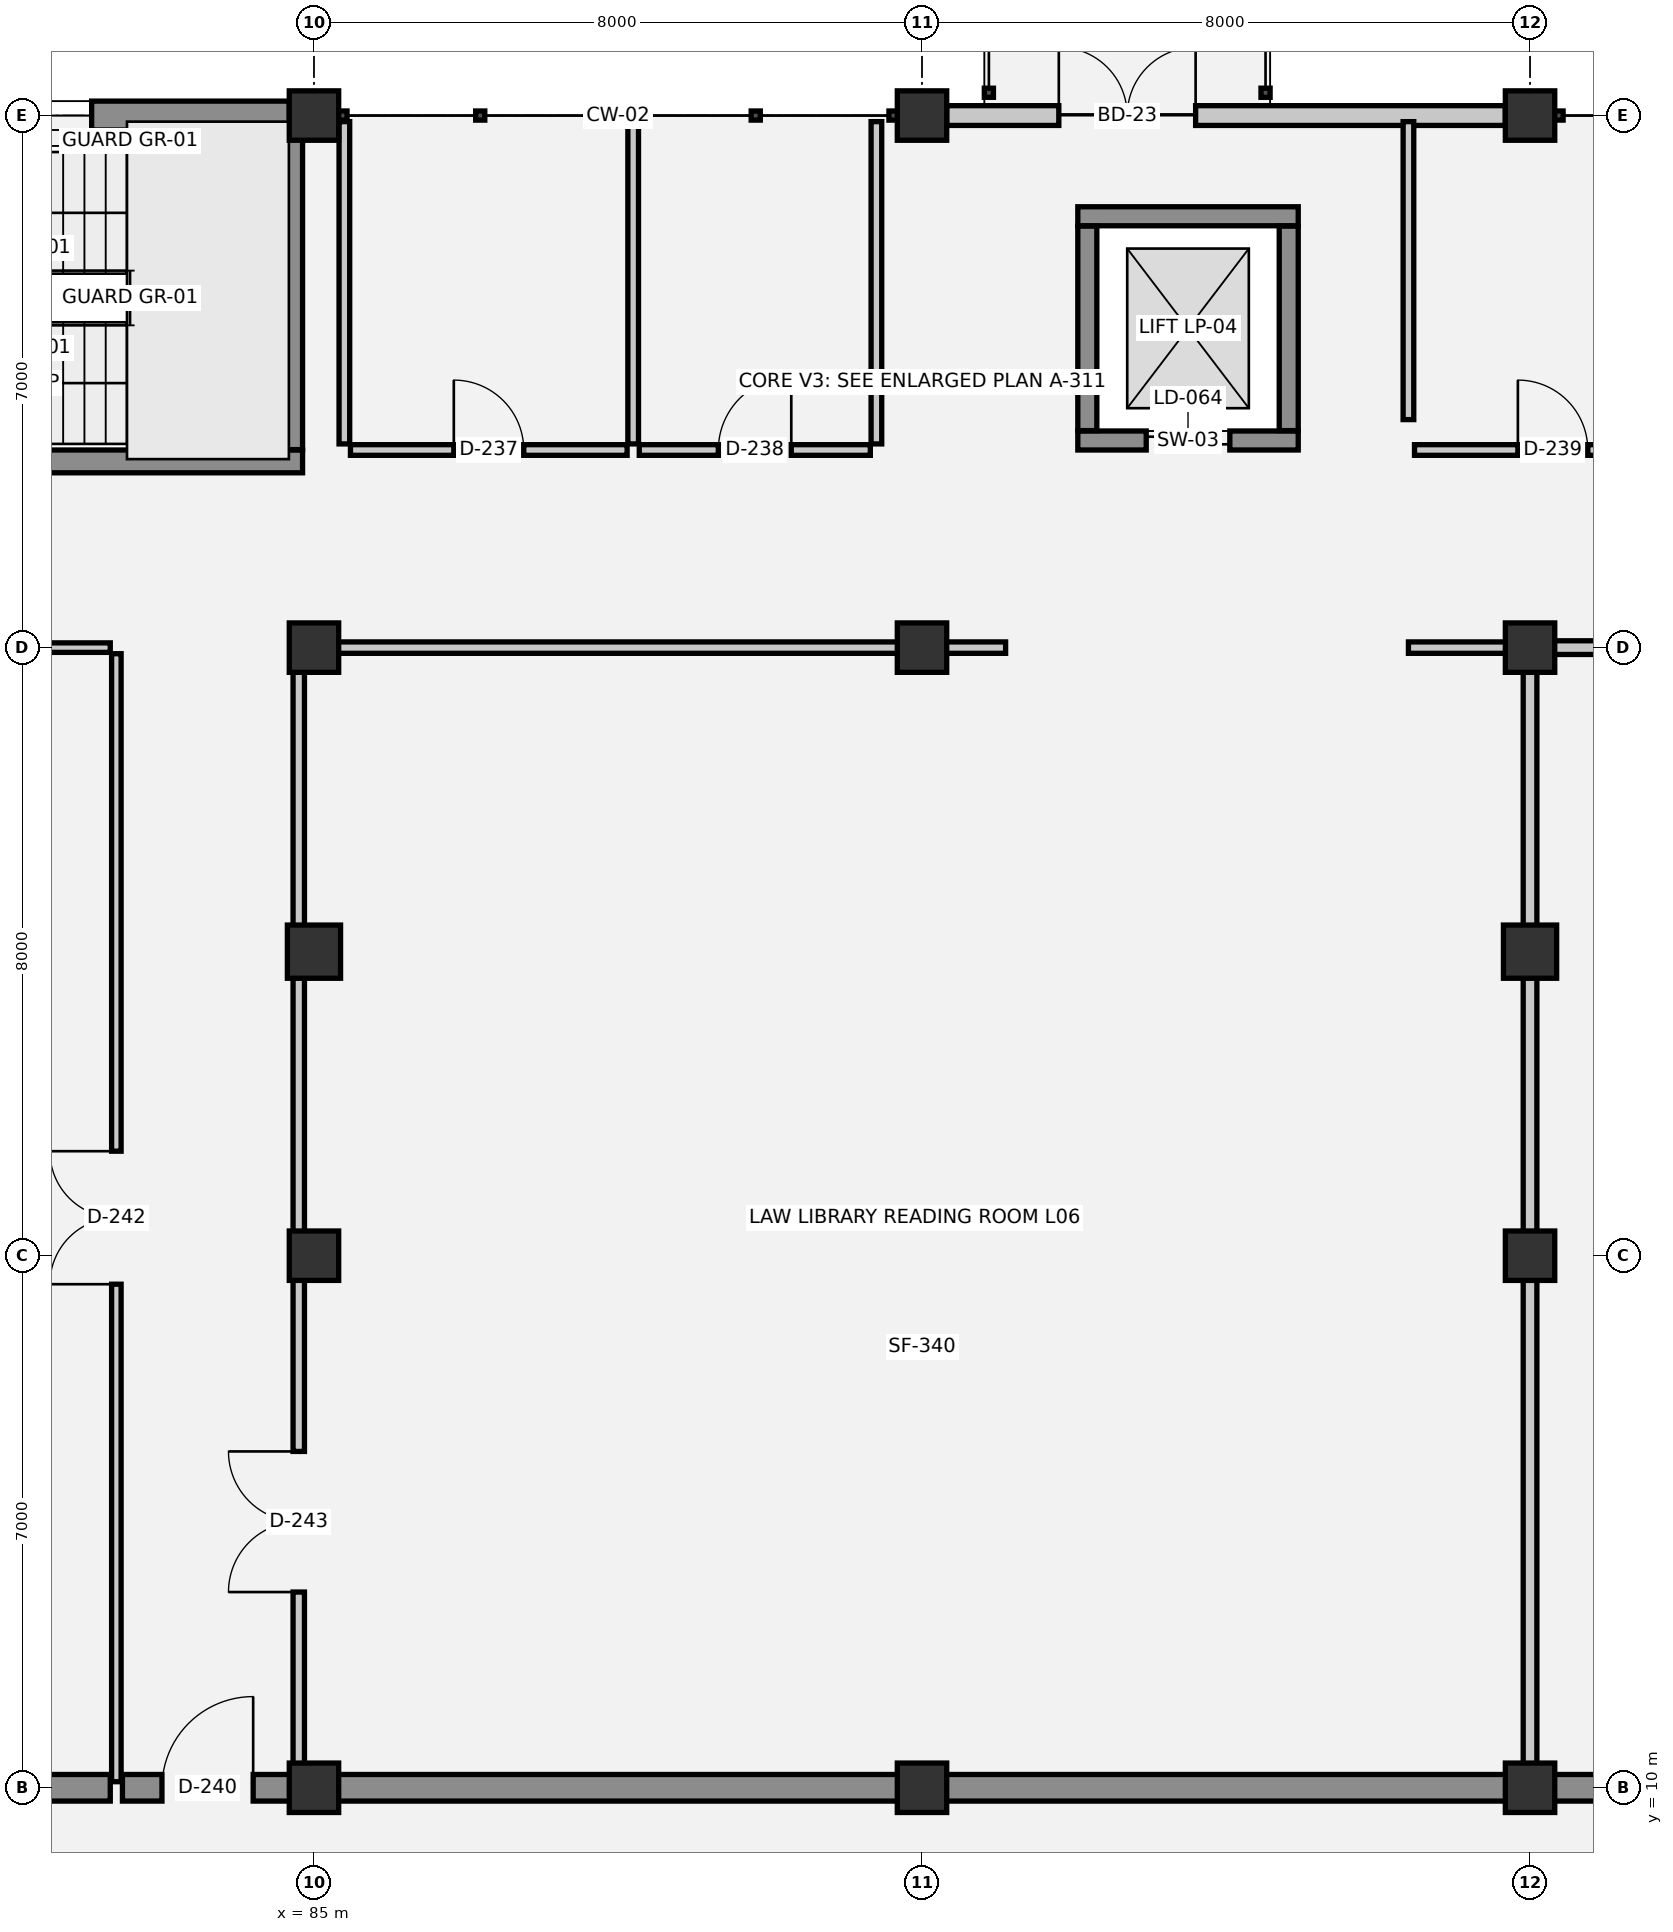
"""IFC4 building model, lengths in metres.
Left out: names, types, materials, properties, quantities, classifications, styles, units other than length and angle.
Written with IfcOpenShell. Run it as: python <this file> out.ifc"""

import sys

from ifc_helpers import new_model, si_unit, direction, frame, frame_2d, origin, origin_2d, place, context, subcontext, project, spatial, rectangle, circle, extrude, element, fill, save


model = new_model("IFC4")
c1 = context("Model", 3, precision=1e-05, world=origin(), true_north=direction((0.0, 1.0)))
c2 = subcontext(c1, "Body", "Model", "MODEL_VIEW")
j1 = project(units=[si_unit("LENGTHUNIT", "METRE"), si_unit("PLANEANGLEUNIT", "RADIAN")], contexts=[c1])
p1 = place(None, origin())
s1 = spatial("IfcSite", under=j1, at=p1, CompositionType="ELEMENT")
p2 = place(p1, origin())
s2 = spatial("IfcBuilding", under=s1, at=p2, CompositionType="ELEMENT")
p3 = place(p2, frame((0.0, 0.0, 9.9)))
s3 = spatial("IfcBuildingStorey", under=s2, at=p3, CompositionType="ELEMENT", Elevation=9.9)
for number, where, z_axis, x_axis in (
    (1, (85.0, 10.0, 0.0), (0.0, 0.0, 1.0), (1.0, 0.0, 0.0)),
    (2, (85.0, 17.0, 0.0), (0.0, 0.0, 1.0), (1.0, 0.0, 0.0)),
    (3, (85.0, 25.0, 0.0), (0.0, 0.0, 1.0), (1.0, 0.0, 0.0)),
    (4, (85.0, 32.0, 0.0), (0.0, 0.0, 1.0), (1.0, 0.0, 0.0)),
    (5, (93.0, 10.0, 0.0), (0.0, 0.0, 1.0), (1.0, 0.0, 0.0)),
    (6, (93.0, 25.0, 0.0), (0.0, 0.0, 1.0), (1.0, 0.0, 0.0)),
    (7, (93.0, 32.0, 0.0), (0.0, 0.0, 1.0), (1.0, 0.0, 0.0)),
    (8, (101.0, 10.0, 0.0), (0.0, 0.0, 1.0), (1.0, 0.0, 0.0)),
    (9, (101.0, 17.0, 0.0), (0.0, 0.0, 1.0), (1.0, 0.0, 0.0)),
    (10, (101.0, 25.0, 0.0), (0.0, 0.0, 1.0), (1.0, 0.0, 0.0)),
    (11, (101.0, 32.0, 0.0), (0.0, 0.0, 1.0), (1.0, 0.0, 0.0)),
):
    element("IfcColumn", number, at=place(p3, frame(where, z_axis=z_axis, x_axis=x_axis)), inside=s3, PredefinedType="COLUMN", context=c2, shape_type="SweptSolid", body=[
        extrude(rectangle(XDim=0.65, YDim=0.65, at=origin_2d()), origin(), (0.0, 0.0, 1.0), 4.5),
    ])
for number, where, z_axis, x_axis in (
    (12, (85.0, 21.0, 0.0), (0.0, 0.0, 1.0), (1.0, 0.0, 0.0)),
    (13, (101.0, 21.0, 0.0), (0.0, 0.0, 1.0), (1.0, 0.0, 0.0)),
):
    element("IfcColumn", number, at=place(p3, frame(where, z_axis=z_axis, x_axis=x_axis)), inside=s3, PredefinedType="COLUMN", context=c2, shape_type="SweptSolid", body=[
        extrude(circle(Radius=0.35, at=origin_2d()), origin(), (0.0, 0.0, 1.0), 4.5),
    ])
p4 = place(p3, frame((77.325, 32.0, 0.0), z_axis=(0.0, 0.0, 1.0), x_axis=(1.0, 0.0, 0.0)))
e14 = element("IfcWall", 14, at=p4, inside=s3, PredefinedType="STANDARD", context=c2, shape_type="SweptSolid", body=[
    extrude(rectangle(XDim=7.35, YDim=0.38, at=frame_2d((3.675, 0.0))), origin(), (0.0, 0.0, 1.0), 3.44),
])
p5 = place(p4, frame((2.6, 0.0, 0.95)))
e15 = element("IfcOpeningElement", 15, at=p5, cuts=e14, PredefinedType="OPENING", context=c2, shape_type="SweptSolid", body=[
    extrude(rectangle(XDim=2.15, YDim=1.9, at=frame_2d((1.075, 0.95))), frame((0.0, 0.2, 0.0), z_axis=(0.0, -1.0, 0.0), x_axis=(1.0, 0.0, 0.0)), (0.0, 0.0, 1.0), 0.4),
])
p6 = place(p3, frame((93.325, 32.0, 0.0), z_axis=(0.0, 0.0, 1.0), x_axis=(1.0, 0.0, 0.0)))
e16 = element("IfcWall", 16, at=p6, inside=s3, PredefinedType="SOLIDWALL", context=c2, shape_type="SweptSolid", body=[
    extrude(rectangle(XDim=7.35, YDim=0.26, at=frame_2d((3.675, 0.0))), origin(), (0.0, 0.0, 1.0), 3.44),
])
p7 = place(p6, frame((1.475, 0.0, 0.0)))
e17 = element("IfcOpeningElement", 17, at=p7, cuts=e16, PredefinedType="OPENING", context=c2, shape_type="SweptSolid", body=[
    extrude(rectangle(XDim=1.8, YDim=2.25, at=frame_2d((0.9, 1.125))), frame((0.0, 0.14, 0.0), z_axis=(0.0, -1.0, 0.0), x_axis=(1.0, 0.0, 0.0)), (0.0, 0.0, 1.0), 0.28),
])
p8 = place(p3, frame((95.05, 27.725, 0.0), z_axis=(0.0, 0.0, 1.0), x_axis=(1.0, 0.0, 0.0)))
e18 = element("IfcWall", 18, at=p8, inside=s3, PredefinedType="SHEAR", context=c2, shape_type="SweptSolid", body=[
    extrude(rectangle(XDim=2.9, YDim=0.25, at=frame_2d((1.45, 0.0))), origin(), (0.0, 0.0, 1.0), 4.5),
])
p9 = place(p8, frame((0.9, 0.0, 0.0)))
e19 = element("IfcOpeningElement", 19, at=p9, cuts=e18, PredefinedType="OPENING", context=c2, shape_type="SweptSolid", body=[
    extrude(rectangle(XDim=1.1, YDim=2.15, at=frame_2d((0.55, 1.075))), frame((0.0, 0.135, 0.0), z_axis=(0.0, -1.0, 0.0), x_axis=(1.0, 0.0, 0.0)), (0.0, 0.0, 1.0), 0.27),
])
p10 = place(p3, frame((97.95, 30.675, 0.0), z_axis=(0.0, 0.0, 1.0), x_axis=(-1.0, 0.0, 0.0)))
e20 = element("IfcWall", 20, at=p10, inside=s3, PredefinedType="SHEAR", context=c2, shape_type="SweptSolid", body=[
    extrude(rectangle(XDim=2.9, YDim=0.25, at=frame_2d((1.45, 0.0))), origin(), (0.0, 0.0, 1.0), 4.5),
])
for number, where, z_axis, x_axis in (
    (21, (95.175, 30.545, 0.0), (0.0, 0.0, 1.0), (0.0, -1.0, 0.0)),
    (22, (97.825, 27.855, 0.0), (0.0, 0.0, 1.0), (0.0, 1.0, 0.0)),
):
    element("IfcWall", number, at=place(p3, frame(where, z_axis=z_axis, x_axis=x_axis)), inside=s3, PredefinedType="SHEAR", context=c2, shape_type="SweptSolid", body=[
        extrude(rectangle(XDim=2.69, YDim=0.25, at=frame_2d((1.345, 0.0))), origin(), (0.0, 0.0, 1.0), 4.5),
    ])
p11 = place(p3, frame((77.15, 27.45, 0.0), z_axis=(0.0, 0.0, 1.0), x_axis=(1.0, 0.0, 0.0)))
e23 = element("IfcWall", 23, at=p11, inside=s3, PredefinedType="SHEAR", context=c2, shape_type="SweptSolid", body=[
    extrude(rectangle(XDim=7.7, YDim=0.3, at=frame_2d((3.85, 0.0))), origin(), (0.0, 0.0, 1.0), 4.16),
])
p12 = place(p11, frame((0.425, 0.0, 0.0)))
e24 = element("IfcOpeningElement", 24, at=p12, cuts=e23, PredefinedType="OPENING", context=c2, shape_type="SweptSolid", body=[
    extrude(rectangle(XDim=1.25, YDim=2.15, at=frame_2d((0.625, 1.075))), frame((0.0, 0.16, 0.0), z_axis=(0.0, -1.0, 0.0), x_axis=(1.0, 0.0, 0.0)), (0.0, 0.0, 1.0), 0.32),
])
p13 = place(p3, frame((84.7, 27.605, 0.0), z_axis=(0.0, 0.0, 1.0), x_axis=(0.0, 1.0, 0.0)))
e25 = element("IfcWall", 25, at=p13, inside=s3, PredefinedType="SHEAR", context=c2, shape_type="SweptSolid", body=[
    extrude(rectangle(XDim=4.2, YDim=0.3, at=frame_2d((2.1, 0.0))), origin(), (0.0, 0.0, 1.0), 4.16),
])
p14 = place(p3, frame((69.08, 10.0, 0.0), z_axis=(0.0, 0.0, 1.0), x_axis=(1.0, 0.0, 0.0)))
e26 = element("IfcWall", 26, at=p14, inside=s3, PredefinedType="SHEAR", context=c2, shape_type="SweptSolid", body=[
    extrude(rectangle(XDim=13.24, YDim=0.35, at=frame_2d((6.62, 0.0))), origin(), (0.0, 0.0, 1.0), 4.14),
])
p15 = place(p3, frame((82.48, 10.0, 0.0), z_axis=(0.0, 0.0, 1.0), x_axis=(1.0, 0.0, 0.0)))
e27 = element("IfcWall", 27, at=p15, inside=s3, PredefinedType="SHEAR", context=c2, shape_type="SweptSolid", body=[
    extrude(rectangle(XDim=2.24, YDim=0.35, at=frame_2d((1.12, 0.0))), origin(), (0.0, 0.0, 1.0), 4.14),
])
p16 = place(p15, frame((0.52, 0.0, 0.0)))
e28 = element("IfcOpeningElement", 28, at=p16, cuts=e27, PredefinedType="OPENING", context=c2, shape_type="SweptSolid", body=[
    extrude(rectangle(XDim=1.2, YDim=2.15, at=frame_2d((0.6, 1.075))), frame((0.0, 0.185, 0.0), z_axis=(0.0, -1.0, 0.0), x_axis=(1.0, 0.0, 0.0)), (0.0, 0.0, 1.0), 0.37),
])
p17 = place(p3, frame((84.88, 10.0, 0.0), z_axis=(0.0, 0.0, 1.0), x_axis=(1.0, 0.0, 0.0)))
e29 = element("IfcWall", 29, at=p17, inside=s3, PredefinedType="SHEAR", context=c2, shape_type="SweptSolid", body=[
    extrude(rectangle(XDim=16.04, YDim=0.35, at=frame_2d((8.02, 0.0))), origin(), (0.0, 0.0, 1.0), 4.14),
])
p18 = place(p3, frame((101.08, 10.0, 0.0), z_axis=(0.0, 0.0, 1.0), x_axis=(1.0, 0.0, 0.0)))
e30 = element("IfcWall", 30, at=p18, inside=s3, PredefinedType="SHEAR", context=c2, shape_type="SweptSolid", body=[
    extrude(rectangle(XDim=15.84, YDim=0.35, at=frame_2d((7.92, 0.0))), origin(), (0.0, 0.0, 1.0), 4.14),
])
p19 = place(p3, frame((69.08, 25.0, 0.0), z_axis=(0.0, 0.0, 1.0), x_axis=(1.0, 0.0, 0.0)))
e31 = element("IfcWall", 31, at=p19, inside=s3, PredefinedType="PARTITIONING", context=c2, shape_type="SweptSolid", body=[
    extrude(rectangle(XDim=13.24, YDim=0.125, at=frame_2d((6.62, 0.0))), origin(), (0.0, 0.0, 1.0), 3.56),
])
p20 = place(p3, frame((84.88, 25.0, 0.0), z_axis=(0.0, 0.0, 1.0), x_axis=(1.0, 0.0, 0.0)))
e32 = element("IfcWall", 32, at=p20, inside=s3, PredefinedType="PARTITIONING", context=c2, shape_type="SweptSolid", body=[
    extrude(rectangle(XDim=9.22, YDim=0.15, at=frame_2d((4.61, 0.0))), origin(), (0.0, 0.0, 1.0), 3.56),
])
p21 = place(p3, frame((99.4, 25.0, 0.0), z_axis=(0.0, 0.0, 1.0), x_axis=(1.0, 0.0, 0.0)))
e33 = element("IfcWall", 33, at=p21, inside=s3, PredefinedType="PARTITIONING", context=c2, shape_type="SweptSolid", body=[
    extrude(rectangle(XDim=1.52, YDim=0.15, at=frame_2d((0.76, 0.0))), origin(), (0.0, 0.0, 1.0), 3.56),
])
p22 = place(p3, frame((101.08, 25.0, 0.0), z_axis=(0.0, 0.0, 1.0), x_axis=(1.0, 0.0, 0.0)))
e34 = element("IfcWall", 34, at=p22, inside=s3, PredefinedType="PARTITIONING", context=c2, shape_type="SweptSolid", body=[
    extrude(rectangle(XDim=15.84, YDim=0.18, at=frame_2d((7.92, 0.0))), origin(), (0.0, 0.0, 1.0), 3.56),
])
p23 = place(p22, frame((5.247, 0.0, 0.0)))
e35 = element("IfcOpeningElement", 35, at=p23, cuts=e34, PredefinedType="OPENING", context=c2, shape_type="SweptSolid", body=[
    extrude(rectangle(XDim=1.15, YDim=2.2, at=frame_2d((0.575, 1.1))), frame((0.0, 0.1, 0.0), z_axis=(0.0, -1.0, 0.0), x_axis=(1.0, 0.0, 0.0)), (0.0, 0.0, 1.0), 0.2),
])
p24 = place(p3, frame((85.48, 27.6, 0.0), z_axis=(0.0, 0.0, 1.0), x_axis=(1.0, 0.0, 0.0)))
e36 = element("IfcWall", 36, at=p24, inside=s3, PredefinedType="PLUMBINGWALL", context=c2, shape_type="SweptSolid", body=[
    extrude(rectangle(XDim=3.64, YDim=0.14, at=frame_2d((1.82, 0.0))), origin(), (0.0, 0.0, 1.0), 4.14),
])
p25 = place(p24, frame((1.36, 0.0, 0.0)))
e37 = element("IfcOpeningElement", 37, at=p25, cuts=e36, PredefinedType="OPENING", context=c2, shape_type="SweptSolid", body=[
    extrude(rectangle(XDim=0.92, YDim=2.1, at=frame_2d((0.46, 1.05))), frame((0.0, 0.08, 0.0), z_axis=(0.0, -1.0, 0.0), x_axis=(1.0, 0.0, 0.0)), (0.0, 0.0, 1.0), 0.16),
])
p26 = place(p3, frame((89.28, 27.6, 0.0), z_axis=(0.0, 0.0, 1.0), x_axis=(1.0, 0.0, 0.0)))
e38 = element("IfcWall", 38, at=p26, inside=s3, PredefinedType="PLUMBINGWALL", context=c2, shape_type="SweptSolid", body=[
    extrude(rectangle(XDim=3.04, YDim=0.14, at=frame_2d((1.52, 0.0))), origin(), (0.0, 0.0, 1.0), 4.14),
])
p27 = place(p26, frame((1.04, 0.0, 0.0)))
e39 = element("IfcOpeningElement", 39, at=p27, cuts=e38, PredefinedType="OPENING", context=c2, shape_type="SweptSolid", body=[
    extrude(rectangle(XDim=0.96, YDim=2.1, at=frame_2d((0.48, 1.05))), frame((0.0, 0.08, 0.0), z_axis=(0.0, -1.0, 0.0), x_axis=(1.0, 0.0, 0.0)), (0.0, 0.0, 1.0), 0.16),
])
p28 = place(p3, frame((99.48, 27.6, 0.0), z_axis=(0.0, 0.0, 1.0), x_axis=(1.0, 0.0, 0.0)))
e40 = element("IfcWall", 40, at=p28, inside=s3, PredefinedType="PLUMBINGWALL", context=c2, shape_type="SweptSolid", body=[
    extrude(rectangle(XDim=3.64, YDim=0.14, at=frame_2d((1.82, 0.0))), origin(), (0.0, 0.0, 1.0), 4.14),
])
p29 = place(p28, frame((1.36, 0.0, 0.0)))
e41 = element("IfcOpeningElement", 41, at=p29, cuts=e40, PredefinedType="OPENING", context=c2, shape_type="SweptSolid", body=[
    extrude(rectangle(XDim=0.92, YDim=2.1, at=frame_2d((0.46, 1.05))), frame((0.0, 0.08, 0.0), z_axis=(0.0, -1.0, 0.0), x_axis=(1.0, 0.0, 0.0)), (0.0, 0.0, 1.0), 0.16),
])
p30 = place(p3, frame((82.4, 10.08, 0.0), z_axis=(0.0, 0.0, 1.0), x_axis=(0.0, 1.0, 0.0)))
e42 = element("IfcWall", 42, at=p30, inside=s3, PredefinedType="PARTITIONING", context=c2, shape_type="SweptSolid", body=[
    extrude(rectangle(XDim=14.84, YDim=0.125, at=frame_2d((7.42, 0.0))), origin(), (0.0, 0.0, 1.0), 4.14),
])
p31 = place(p30, frame((6.545, 0.0, 0.0)))
e43 = element("IfcOpeningElement", 43, at=p31, cuts=e42, PredefinedType="OPENING", context=c2, shape_type="SweptSolid", body=[
    extrude(rectangle(XDim=1.75, YDim=2.3, at=frame_2d((0.875, 1.15))), frame((0.0, 0.073, 0.0), z_axis=(0.0, -1.0, 0.0), x_axis=(1.0, 0.0, 0.0)), (0.0, 0.0, 1.0), 0.145),
])
p32 = place(p3, frame((84.8, 10.08, 0.0), z_axis=(0.0, 0.0, 1.0), x_axis=(0.0, 1.0, 0.0)))
e44 = element("IfcWall", 44, at=p32, inside=s3, PredefinedType="PARTITIONING", context=c2, shape_type="SweptSolid", body=[
    extrude(rectangle(XDim=14.84, YDim=0.15, at=frame_2d((7.42, 0.0))), origin(), (0.0, 0.0, 1.0), 3.61),
])
p33 = place(p32, frame((2.495, 0.0, 0.0)))
e45 = element("IfcOpeningElement", 45, at=p33, cuts=e44, PredefinedType="OPENING", context=c2, shape_type="SweptSolid", body=[
    extrude(rectangle(XDim=1.85, YDim=2.3, at=frame_2d((0.925, 1.15))), frame((0.0, 0.085, 0.0), z_axis=(0.0, -1.0, 0.0), x_axis=(1.0, 0.0, 0.0)), (0.0, 0.0, 1.0), 0.17),
])
for number, where, z_axis, x_axis in (
    (46, (85.4, 27.68, 0.0), (0.0, 0.0, 1.0), (0.0, 1.0, 0.0)),
    (47, (89.2, 27.68, 0.0), (0.0, 0.0, 1.0), (0.0, 1.0, 0.0)),
    (48, (92.4, 27.68, 0.0), (0.0, 0.0, 1.0), (0.0, 1.0, 0.0)),
):
    element("IfcWall", number, at=place(p3, frame(where, z_axis=z_axis, x_axis=x_axis)), inside=s3, PredefinedType="PLUMBINGWALL", context=c2, shape_type="SweptSolid", body=[
        extrude(rectangle(XDim=4.24, YDim=0.14, at=frame_2d((2.12, 0.0))), origin(), (0.0, 0.0, 1.0), 4.14),
    ])
p34 = place(p3, frame((99.4, 28.0, 0.0), z_axis=(0.0, 0.0, 1.0), x_axis=(0.0, 1.0, 0.0)))
e49 = element("IfcWall", 49, at=p34, inside=s3, PredefinedType="PLUMBINGWALL", context=c2, shape_type="SweptSolid", body=[
    extrude(rectangle(XDim=3.92, YDim=0.14, at=frame_2d((1.96, 0.0))), origin(), (0.0, 0.0, 1.0), 4.14),
])
p35 = place(p3, frame((101.0, 10.08, 0.0), z_axis=(0.0, 0.0, 1.0), x_axis=(0.0, 1.0, 0.0)))
e50 = element("IfcWall", 50, at=p35, inside=s3, PredefinedType="PARTITIONING", context=c2, shape_type="SweptSolid", body=[
    extrude(rectangle(XDim=14.84, YDim=0.18, at=frame_2d((7.42, 0.0))), origin(), (0.0, 0.0, 1.0), 3.61),
])
p36 = place(p7, origin())
e51 = element("IfcDoor", 51, at=p36, inside=s3, OperationType="DOUBLE_DOOR_SINGLE_SWING", PredefinedType="DOOR", context=c2, shape_type="SweptSolid", body=[
    extrude(rectangle(XDim=1.8, YDim=2.25, at=frame_2d((0.9, 1.125))), frame((0.0, 0.025, 0.0), z_axis=(0.0, -1.0, 0.0), x_axis=(1.0, 0.0, 0.0)), (0.0, 0.0, 1.0), 0.05),
])
fill(e17, e51)
p37 = place(p9, origin())
e52 = element("IfcDoor", 52, at=p37, inside=s3, OperationType="DOUBLE_DOOR_SLIDING", PredefinedType="DOOR", context=c2, shape_type="SweptSolid", body=[
    extrude(rectangle(XDim=1.1, YDim=2.15, at=frame_2d((0.55, 1.075))), frame((0.0, 0.025, 0.0), z_axis=(0.0, -1.0, 0.0), x_axis=(1.0, 0.0, 0.0)), (0.0, 0.0, 1.0), 0.05),
])
fill(e19, e52)
p38 = place(p25, origin())
e53 = element("IfcDoor", 53, at=p38, inside=s3, OperationType="SINGLE_SWING_LEFT", PredefinedType="DOOR", context=c2, shape_type="SweptSolid", body=[
    extrude(rectangle(XDim=0.92, YDim=2.1, at=frame_2d((0.46, 1.05))), frame((0.0, 0.025, 0.0), z_axis=(0.0, -1.0, 0.0), x_axis=(1.0, 0.0, 0.0)), (0.0, 0.0, 1.0), 0.05),
])
fill(e37, e53)
p39 = place(p27, origin())
e54 = element("IfcDoor", 54, at=p39, inside=s3, OperationType="SINGLE_SWING_RIGHT", PredefinedType="DOOR", context=c2, shape_type="SweptSolid", body=[
    extrude(rectangle(XDim=0.96, YDim=2.1, at=frame_2d((0.48, 1.05))), frame((0.0, 0.025, 0.0), z_axis=(0.0, -1.0, 0.0), x_axis=(1.0, 0.0, 0.0)), (0.0, 0.0, 1.0), 0.05),
])
fill(e39, e54)
p40 = place(p29, origin())
e55 = element("IfcDoor", 55, at=p40, inside=s3, OperationType="SINGLE_SWING_LEFT", PredefinedType="DOOR", context=c2, shape_type="SweptSolid", body=[
    extrude(rectangle(XDim=0.92, YDim=2.1, at=frame_2d((0.46, 1.05))), frame((0.0, 0.025, 0.0), z_axis=(0.0, -1.0, 0.0), x_axis=(1.0, 0.0, 0.0)), (0.0, 0.0, 1.0), 0.05),
])
fill(e41, e55)
p41 = place(p16, origin())
e56 = element("IfcDoor", 56, at=p41, inside=s3, OperationType="SINGLE_SWING_RIGHT", PredefinedType="DOOR", context=c2, shape_type="SweptSolid", body=[
    extrude(rectangle(XDim=1.2, YDim=2.15, at=frame_2d((0.6, 1.075))), frame((0.0, 0.025, 0.0), z_axis=(0.0, -1.0, 0.0), x_axis=(1.0, 0.0, 0.0)), (0.0, 0.0, 1.0), 0.05),
])
fill(e28, e56)
p42 = place(p31, origin())
e57 = element("IfcDoor", 57, at=p42, inside=s3, OperationType="DOUBLE_DOOR_SINGLE_SWING", PredefinedType="DOOR", context=c2, shape_type="SweptSolid", body=[
    extrude(rectangle(XDim=1.75, YDim=2.3, at=frame_2d((0.875, 1.15))), frame((0.0, 0.025, 0.0), z_axis=(0.0, -1.0, 0.0), x_axis=(1.0, 0.0, 0.0)), (0.0, 0.0, 1.0), 0.05),
])
fill(e43, e57)
p43 = place(p33, origin())
e58 = element("IfcDoor", 58, at=p43, inside=s3, OperationType="DOUBLE_DOOR_SINGLE_SWING", PredefinedType="DOOR", context=c2, shape_type="SweptSolid", body=[
    extrude(rectangle(XDim=1.85, YDim=2.3, at=frame_2d((0.925, 1.15))), frame((0.0, 0.025, 0.0), z_axis=(0.0, -1.0, 0.0), x_axis=(1.0, 0.0, 0.0)), (0.0, 0.0, 1.0), 0.05),
])
fill(e45, e58)
p44 = place(p5, origin())
e59 = element("IfcWindow", 59, at=p44, inside=s3, PartitioningType="SINGLE_PANEL", PredefinedType="WINDOW", context=c2, shape_type="SweptSolid", body=[
    extrude(rectangle(XDim=2.15, YDim=1.9, at=frame_2d((1.075, 0.95))), frame((0.0, 0.03, 0.0), z_axis=(0.0, -1.0, 0.0), x_axis=(1.0, 0.0, 0.0)), (0.0, 0.0, 1.0), 0.06),
])
fill(e15, e59)
save(model, sys.argv[1])
